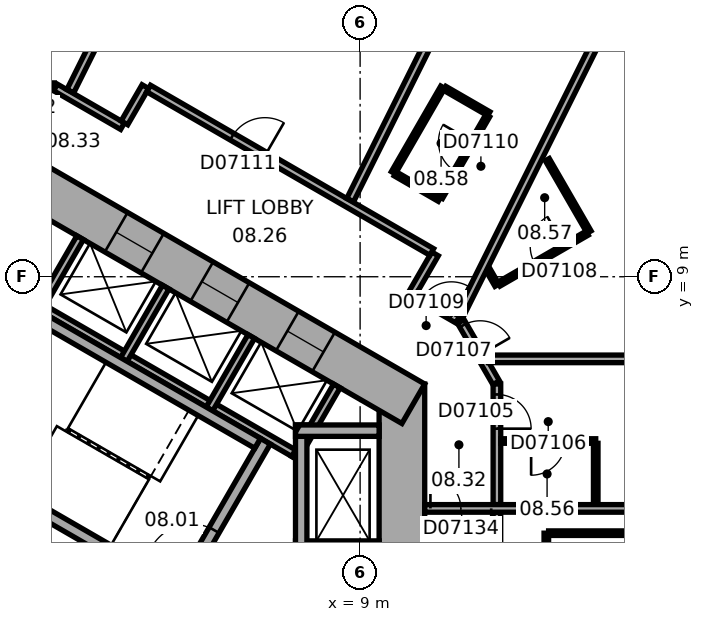
"""IFC4 building model, lengths in metres.
Left out: names, types, materials, properties, quantities, classifications, styles, units other than length and angle.
Written with IfcOpenShell. Run it as: python <this file> out.ifc"""

import sys

from ifc_helpers import new_model, si_unit, direction, frame, frame_2d, origin, place, context, subcontext, project, spatial, rectangle, extrude, element, fill, save


model = new_model("IFC4")
c1 = context("Model", 3, precision=1e-05, world=origin(), true_north=direction((0.0, 1.0)))
c2 = subcontext(c1, "Body", "Model", "MODEL_VIEW")
j1 = project(units=[si_unit("LENGTHUNIT", "METRE"), si_unit("PLANEANGLEUNIT", "RADIAN")], contexts=[c1])
p1 = place(None, origin())
s1 = spatial("IfcSite", under=j1, at=p1, CompositionType="ELEMENT")
p2 = place(p1, origin())
s2 = spatial("IfcBuilding", under=s1, at=p2, CompositionType="ELEMENT")
p3 = place(p2, frame((0.0, 0.0, 47.3)))
s3 = spatial("IfcBuildingStorey", under=s2, at=p3, CompositionType="ELEMENT", Elevation=47.3)
p4 = place(p3, frame((10.1, -6.177, 0.0), z_axis=(0.0, 0.0, 1.0), x_axis=(0.0, 1.0, 0.0)))
e1 = element("IfcWall", 1, at=p4, inside=s3, PredefinedType="SHEAR", context=c2, shape_type="SweptSolid", body=[
    extrude(rectangle(XDim=12.355, YDim=1.2, at=frame_2d((6.177, 0.0))), origin(), (0.0, 0.0, 1.0), 3.3),
])
p5 = place(p4, frame((6.378, 0.0, 0.0)))
e2 = element("IfcOpeningElement", 2, at=p5, cuts=e1, PredefinedType="OPENING", context=c2, shape_type="SweptSolid", body=[
    extrude(rectangle(XDim=1.5, YDim=2.1, at=frame_2d((0.75, 1.05))), frame((0.0, 0.61, 0.0), z_axis=(0.0, -1.0, 0.0), x_axis=(1.0, 0.0, 0.0)), (0.0, 0.0, 1.0), 1.22),
])
p6 = place(p4, frame((1.828, 0.0, 0.0)))
e3 = element("IfcOpeningElement", 3, at=p6, cuts=e1, PredefinedType="OPENING", context=c2, shape_type="SweptSolid", body=[
    extrude(rectangle(XDim=1.1, YDim=2.1, at=frame_2d((0.55, 1.05))), frame((0.0, 0.61, 0.0), z_axis=(0.0, -1.0, 0.0), x_axis=(1.0, 0.0, 0.0)), (0.0, 0.0, 1.0), 1.22),
])
p7 = place(p4, frame((4.427, 0.0, 0.0)))
e4 = element("IfcOpeningElement", 4, at=p7, cuts=e1, PredefinedType="OPENING", context=c2, shape_type="SweptSolid", body=[
    extrude(rectangle(XDim=1.1, YDim=2.1, at=frame_2d((0.55, 1.05))), frame((0.0, 0.61, 0.0), z_axis=(0.0, -1.0, 0.0), x_axis=(1.0, 0.0, 0.0)), (0.0, 0.0, 1.0), 1.22),
])
p8 = place(p3, frame((10.4, 5.658, 0.0), z_axis=(0.0, 0.0, 1.0), x_axis=(-0.866021384402, 0.500006961711, 0.0)))
e5 = element("IfcWall", 5, at=p8, inside=s3, PredefinedType="SHEAR", context=c2, shape_type="SweptSolid", body=[
    extrude(rectangle(XDim=12.355, YDim=1.2, at=frame_2d((6.178, 0.0))), origin(), (0.0, 0.0, 1.0), 3.3),
])
p9 = place(p8, frame((2.728, 0.0, 0.0)))
e6 = element("IfcOpeningElement", 6, at=p9, cuts=e5, PredefinedType="OPENING", context=c2, shape_type="SweptSolid", body=[
    extrude(rectangle(XDim=1.1, YDim=2.1, at=frame_2d((0.55, 1.05))), frame((0.0, 0.61, 0.0), z_axis=(0.0, -1.0, 0.0), x_axis=(1.0, 0.0, 0.0)), (0.0, 0.0, 1.0), 1.22),
])
p10 = place(p8, frame((5.328, 0.0, 0.0)))
e7 = element("IfcOpeningElement", 7, at=p10, cuts=e5, PredefinedType="OPENING", context=c2, shape_type="SweptSolid", body=[
    extrude(rectangle(XDim=1.1, YDim=2.1, at=frame_2d((0.55, 1.05))), frame((0.0, 0.61, 0.0), z_axis=(0.0, -1.0, 0.0), x_axis=(1.0, 0.0, 0.0)), (0.0, 0.0, 1.0), 1.22),
])
p11 = place(p8, frame((7.928, 0.0, 0.0)))
e8 = element("IfcOpeningElement", 8, at=p11, cuts=e5, PredefinedType="OPENING", context=c2, shape_type="SweptSolid", body=[
    extrude(rectangle(XDim=1.1, YDim=2.1, at=frame_2d((0.55, 1.05))), frame((0.0, 0.61, 0.0), z_axis=(0.0, -1.0, 0.0), x_axis=(1.0, 0.0, 0.0)), (0.0, 0.0, 1.0), 1.22),
])
p12 = place(p3, frame((7.424, 4.259, 0.0), z_axis=(0.0, 0.0, 1.0), x_axis=(-0.866026010844, 0.49999894854, 0.0)))
e9 = element("IfcWall", 9, at=p12, inside=s3, PredefinedType="PARTITIONING", context=c2, shape_type="SweptSolid", body=[
    extrude(rectangle(XDim=8.0, YDim=0.2, at=frame_2d((4.0, 0.0))), origin(), (0.0, 0.0, 1.0), 3.05),
])
for number, where, z_axis, x_axis in (
    (10, (7.287, 4.222, 0.0), (0.0, 0.0, 1.0), (0.5, 0.866, 0.0)),
    (11, (5.036, 5.522, 0.0), (0.0, 0.0, 1.0), (0.5, 0.866, 0.0)),
    (12, (2.784, 6.822, 0.0), (0.0, 0.0, 1.0), (0.5, 0.866, 0.0)),
    (13, (0.532, 8.122, 0.0), (0.0, 0.0, 1.0), (0.5, 0.866, 0.0)),
):
    element("IfcWall", number, at=place(p3, frame(where, z_axis=z_axis, x_axis=x_axis)), inside=s3, PredefinedType="PARTITIONING", context=c2, shape_type="SweptSolid", body=[
        extrude(rectangle(XDim=2.2, YDim=0.2, at=frame_2d((1.1, 0.0))), origin(), (0.0, 0.0, 1.0), 3.05),
    ])
p13 = place(p3, frame((4.158, 0.602, 0.0), z_axis=(0.0, 0.0, 1.0), x_axis=(0.499977259774, 0.866038532462, 0.0)))
e14 = element("IfcWall", 14, at=p13, inside=s3, PredefinedType="SHEAR", context=c2, shape_type="SweptSolid", body=[
    extrude(rectangle(XDim=4.7, YDim=0.3, at=frame_2d((2.35, 0.0))), origin(), (0.0, 0.0, 1.0), 3.05),
])
p14 = place(p13, frame((0.8, 0.0, 0.0)))
e15 = element("IfcOpeningElement", 15, at=p14, cuts=e14, PredefinedType="OPENING", context=c2, shape_type="SweptSolid", body=[
    extrude(rectangle(XDim=1.2, YDim=2.1, at=frame_2d((0.6, 1.05))), frame((0.0, 0.16, 0.0), z_axis=(0.0, -1.0, 0.0), x_axis=(1.0, 0.0, 0.0)), (0.0, 0.0, 1.0), 0.32),
])
for number, where, z_axis, x_axis in (
    (16, (4.103, 0.807, 0.0), (0.0, 0.0, 1.0), (-0.866, 0.5, 0.0)),
    (17, (6.303, 4.617, 0.0), (0.0, 0.0, 1.0), (-0.866, 0.5, 0.0)),
):
    element("IfcWall", number, at=place(p3, frame(where, z_axis=z_axis, x_axis=x_axis)), inside=s3, PredefinedType="SHEAR", context=c2, shape_type="SweptSolid", body=[
        extrude(rectangle(XDim=7.06, YDim=0.3, at=frame_2d((3.53, 0.0))), origin(), (0.0, 0.0, 1.0), 3.05),
    ])
p15 = place(p3, frame((7.3, 1.9, 0.0), z_axis=(0.0, 0.0, 1.0), x_axis=(1.0, 0.0, 0.0)))
e18 = element("IfcWall", 18, at=p15, inside=s3, PredefinedType="SHEAR", context=c2, shape_type="SweptSolid", body=[
    extrude(rectangle(XDim=2.2, YDim=0.3, at=frame_2d((1.1, 0.0))), origin(), (0.0, 0.0, 1.0), 3.05),
])
p16 = place(p15, frame((0.7, 0.0, 0.0)))
e19 = element("IfcOpeningElement", 19, at=p16, cuts=e18, PredefinedType="OPENING", context=c2, shape_type="SweptSolid", body=[
    extrude(rectangle(XDim=1.1, YDim=2.1, at=frame_2d((0.55, 1.05))), frame((0.0, 0.16, 0.0), z_axis=(0.0, -1.0, 0.0), x_axis=(1.0, 0.0, 0.0)), (0.0, 0.0, 1.0), 0.32),
])
p17 = place(p3, frame((7.45, 1.75, 0.0), z_axis=(0.0, 0.0, 1.0), x_axis=(0.0, 1.0, 0.0)))
e20 = element("IfcWall", 20, at=p17, inside=s3, PredefinedType="SHEAR", context=c2, shape_type="SweptSolid", body=[
    extrude(rectangle(XDim=3.35, YDim=0.3, at=frame_2d((1.675, 0.0))), origin(), (0.0, 0.0, 1.0), 3.05),
])
p18 = place(p3, frame((7.3, 4.95, 0.0), z_axis=(0.0, 0.0, 1.0), x_axis=(1.0, 0.0, 0.0)))
e21 = element("IfcWall", 21, at=p18, inside=s3, PredefinedType="SHEAR", context=c2, shape_type="SweptSolid", body=[
    extrude(rectangle(XDim=2.2, YDim=0.3, at=frame_2d((1.1, 0.0))), origin(), (0.0, 0.0, 1.0), 3.05),
])
p19 = place(p3, frame((0.95, 14.001, 0.0), z_axis=(0.0, 0.0, 1.0), x_axis=(-1.0, 0.0, 0.0)))
e22 = element("IfcWall", 22, at=p19, inside=s3, PredefinedType="PARTITIONING", context=c2, shape_type="SweptSolid", body=[
    extrude(rectangle(XDim=1.86, YDim=0.2, at=frame_2d((0.93, 0.0))), origin(), (0.0, 0.0, 1.0), 3.05),
])
p20 = place(p19, frame((0.48, 0.0, 0.0)))
e23 = element("IfcOpeningElement", 23, at=p20, cuts=e22, PredefinedType="OPENING", context=c2, shape_type="SweptSolid", body=[
    extrude(rectangle(XDim=0.9, YDim=2.1, at=frame_2d((0.45, 1.05))), frame((0.0, 0.11, 0.0), z_axis=(0.0, -1.0, 0.0), x_axis=(1.0, 0.0, 0.0)), (0.0, 0.0, 1.0), 0.22),
])
p21 = place(p3, frame((2.748, 12.962, 0.0), z_axis=(0.0, 0.0, 1.0), x_axis=(-0.866013897511, 0.50001992892, 0.0)))
e24 = element("IfcWall", 24, at=p21, inside=s3, PredefinedType="PARTITIONING", context=c2, shape_type="SweptSolid", body=[
    extrude(rectangle(XDim=2.037, YDim=0.2, at=frame_2d((1.018, 0.0))), origin(), (0.0, 0.0, 1.0), 3.05),
])
p22 = place(p3, frame((3.349, 14.002, 0.0), z_axis=(0.0, 0.0, 1.0), x_axis=(-0.500074377092, -0.865982457891, 0.0)))
e25 = element("IfcWall", 25, at=p22, inside=s3, PredefinedType="PARTITIONING", context=c2, shape_type="SweptSolid", body=[
    extrude(rectangle(XDim=1.101, YDim=0.2, at=frame_2d((0.55, 0.0))), origin(), (0.0, 0.0, 1.0), 3.05),
])
p23 = place(p3, frame((5.351, 21.859, 0.0), z_axis=(0.0, 0.0, 1.0), x_axis=(-0.446205309328, -0.894930624086, 0.0)))
e26 = element("IfcWall", 26, at=p23, inside=s3, PredefinedType="PARTITIONING", context=c2, shape_type="SweptSolid", body=[
    extrude(rectangle(XDim=8.913, YDim=0.2, at=frame_2d((4.457, 0.0))), origin(), (0.0, 0.0, 1.0), 2.6),
])
p24 = place(p3, frame((9.875, 11.736, 0.0), z_axis=(0.0, 0.0, 1.0), x_axis=(0.499936506574, 0.866062058628, 0.0)))
e27 = element("IfcWall", 27, at=p24, inside=s3, PredefinedType="PARTITIONING", context=c2, shape_type="SweptSolid", body=[
    extrude(rectangle(XDim=2.6, YDim=0.12, at=frame_2d((1.3, 0.0))), origin(), (0.0, 0.0, 1.0), 3.05),
])
p25 = place(p3, frame((10.371, 8.561, 0.0), z_axis=(0.0, 0.0, 1.0), x_axis=(0.499986357472, 0.866033280158, 0.0)))
e28 = element("IfcWall", 28, at=p25, inside=s3, PredefinedType="PARTITIONING", context=c2, shape_type="SweptSolid", body=[
    extrude(rectangle(XDim=1.201, YDim=0.2, at=frame_2d((0.601, 0.0))), origin(), (0.0, 0.0, 1.0), 3.05),
])
p26 = place(p3, frame((10.885, 9.652, 0.0), z_axis=(0.0, 0.0, 1.0), x_axis=(-0.866033868542, 0.499985338323, 0.0)))
e29 = element("IfcWall", 29, at=p26, inside=s3, PredefinedType="PARTITIONING", context=c2, shape_type="SweptSolid", body=[
    extrude(rectangle(XDim=8.602, YDim=0.2, at=frame_2d((4.301, 0.0))), origin(), (0.0, 0.0, 1.0), 3.05),
])
p27 = place(p26, frame((5.069, 0.0, 0.0)))
e30 = element("IfcOpeningElement", 30, at=p27, cuts=e29, PredefinedType="OPENING", context=c2, shape_type="SweptSolid", body=[
    extrude(rectangle(XDim=1.0, YDim=2.1, at=frame_2d((0.5, 1.05))), frame((0.0, 0.11, 0.0), z_axis=(0.0, -1.0, 0.0), x_axis=(1.0, 0.0, 0.0)), (0.0, 0.0, 1.0), 0.22),
])
for number, where, z_axis, x_axis in (
    (31, (11.087, 11.036, 0.0), (0.0, 0.0, 1.0), (-0.866, 0.5, 0.0)),
    (32, (11.226, 13.958, 0.0), (0.0, 0.0, 1.0), (0.866, -0.5, 0.0)),
):
    element("IfcWall", number, at=place(p3, frame(where, z_axis=z_axis, x_axis=x_axis)), inside=s3, PredefinedType="PARTITIONING", context=c2, shape_type="SweptSolid", body=[
        extrude(rectangle(XDim=1.34, YDim=0.12, at=frame_2d((0.67, 0.0))), origin(), (0.0, 0.0, 1.0), 3.05),
    ])
p28 = place(p3, frame((11.566, 7.871, 0.0), z_axis=(0.0, 0.0, 1.0), x_axis=(-0.866004557827, 0.500036104519, 0.0)))
e33 = element("IfcWall", 33, at=p28, inside=s3, PredefinedType="PARTITIONING", context=c2, shape_type="SweptSolid", body=[
    extrude(rectangle(XDim=1.28, YDim=0.2, at=frame_2d((0.64, 0.0))), origin(), (0.0, 0.0, 1.0), 3.05),
])
p29 = place(p28, frame((0.19, 0.0, 0.0)))
e34 = element("IfcOpeningElement", 34, at=p29, cuts=e33, PredefinedType="OPENING", context=c2, shape_type="SweptSolid", body=[
    extrude(rectangle(XDim=0.9, YDim=2.1, at=frame_2d((0.45, 1.05))), frame((0.0, 0.11, 0.0), z_axis=(0.0, -1.0, 0.0), x_axis=(1.0, 0.0, 0.0)), (0.0, 0.0, 1.0), 0.22),
])
p30 = place(p3, frame((12.357, 13.236, 0.0), z_axis=(0.0, 0.0, 1.0), x_axis=(-0.50000366821, -0.866023285932, 0.0)))
e35 = element("IfcWall", 35, at=p30, inside=s3, PredefinedType="PARTITIONING", context=c2, shape_type="SweptSolid", body=[
    extrude(rectangle(XDim=2.48, YDim=0.12, at=frame_2d((1.24, 0.0))), origin(), (0.0, 0.0, 1.0), 3.05),
])
p31 = place(p30, frame((0.79, 0.0, 0.0)))
e36 = element("IfcOpeningElement", 36, at=p31, cuts=e35, PredefinedType="OPENING", context=c2, shape_type="SweptSolid", body=[
    extrude(rectangle(XDim=0.9, YDim=2.1, at=frame_2d((0.45, 1.05))), frame((0.0, 0.07, 0.0), z_axis=(0.0, -1.0, 0.0), x_axis=(1.0, 0.0, 0.0)), (0.0, 0.0, 1.0), 0.14),
])
p32 = place(p3, frame((12.393, 18.348, 0.0), z_axis=(0.0, 0.0, 1.0), x_axis=(-0.446176022699, -0.894945225569, 0.0)))
e37 = element("IfcWall", 37, at=p32, inside=s3, PredefinedType="PARTITIONING", context=c2, shape_type="SweptSolid", body=[
    extrude(rectangle(XDim=8.191, YDim=0.2, at=frame_2d((4.095, 0.0))), origin(), (0.0, 0.0, 1.0), 2.6),
])
p33 = place(p3, frame((12.58, 6.212, 0.0), z_axis=(0.0, 0.0, 1.0), x_axis=(-0.500063286585, 0.865988862174, 0.0)))
e38 = element("IfcWall", 38, at=p33, inside=s3, PredefinedType="PARTITIONING", context=c2, shape_type="SweptSolid", body=[
    extrude(rectangle(XDim=1.86, YDim=0.2, at=frame_2d((0.93, 0.0))), origin(), (0.0, 0.0, 1.0), 3.05),
])
p34 = place(p33, frame((0.842, 0.0, 0.0)))
e39 = element("IfcOpeningElement", 39, at=p34, cuts=e38, PredefinedType="OPENING", context=c2, shape_type="SweptSolid", body=[
    extrude(rectangle(XDim=0.9, YDim=2.1, at=frame_2d((0.45, 1.05))), frame((0.0, 0.11, 0.0), z_axis=(0.0, -1.0, 0.0), x_axis=(1.0, 0.0, 0.0)), (0.0, 0.0, 1.0), 0.22),
])
p35 = place(p3, frame((12.6, 0.201, 0.0), z_axis=(0.0, 0.0, 1.0), x_axis=(0.0, 1.0, 0.0)))
e40 = element("IfcWall", 40, at=p35, inside=s3, PredefinedType="PARTITIONING", context=c2, shape_type="SweptSolid", body=[
    extrude(rectangle(XDim=2.604, YDim=0.2, at=frame_2d((1.302, 0.0))), origin(), (0.0, 0.0, 1.0), 3.05),
])
p36 = place(p3, frame((12.6, 3.004, 0.0), z_axis=(0.0, 0.0, 1.0), x_axis=(0.0, 1.0, 0.0)))
e41 = element("IfcWall", 41, at=p36, inside=s3, PredefinedType="PARTITIONING", context=c2, shape_type="SweptSolid", body=[
    extrude(rectangle(XDim=3.173, YDim=0.2, at=frame_2d((1.586, 0.0))), origin(), (0.0, 0.0, 1.0), 3.05),
])
p37 = place(p36, frame((1.998, 0.0, 0.0)))
e42 = element("IfcOpeningElement", 42, at=p37, cuts=e41, PredefinedType="OPENING", context=c2, shape_type="SweptSolid", body=[
    extrude(rectangle(XDim=0.9, YDim=2.1, at=frame_2d((0.45, 1.05))), frame((0.0, 0.11, 0.0), z_axis=(0.0, -1.0, 0.0), x_axis=(1.0, 0.0, 0.0)), (0.0, 0.0, 1.0), 0.22),
])
p38 = place(p3, frame((12.601, 8.776, 0.0), z_axis=(0.0, 0.0, 1.0), x_axis=(-0.500166486798, 0.865929261247, 0.0)))
e43 = element("IfcWall", 43, at=p38, inside=s3, PredefinedType="PARTITIONING", context=c2, shape_type="SweptSolid", body=[
    extrude(rectangle(XDim=0.476, YDim=0.12, at=frame_2d((0.238, 0.0))), origin(), (0.0, 0.0, 1.0), 3.05),
])
p39 = place(p3, frame((12.7, 4.677, 0.0), z_axis=(0.0, 0.0, 1.0), x_axis=(1.0, 0.0, 0.0)))
e44 = element("IfcWall", 44, at=p39, inside=s3, PredefinedType="PARTITIONING", context=c2, shape_type="SweptSolid", body=[
    extrude(rectangle(XDim=2.5, YDim=0.12, at=frame_2d((1.25, 0.0))), origin(), (0.0, 0.0, 1.0), 3.05),
])
p40 = place(p39, frame((0.8, 0.0, 0.0)))
e45 = element("IfcOpeningElement", 45, at=p40, cuts=e44, PredefinedType="OPENING", context=c2, shape_type="SweptSolid", body=[
    extrude(rectangle(XDim=0.9, YDim=2.1, at=frame_2d((0.45, 1.05))), frame((0.0, 0.07, 0.0), z_axis=(0.0, -1.0, 0.0), x_axis=(1.0, 0.0, 0.0)), (0.0, 0.0, 1.0), 0.14),
])
p41 = place(p3, frame((13.9, 0.853, 0.0), z_axis=(0.0, 0.0, 1.0), x_axis=(0.0, 1.0, 0.0)))
e46 = element("IfcWall", 46, at=p41, inside=s3, PredefinedType="PARTITIONING", context=c2, shape_type="SweptSolid", body=[
    extrude(rectangle(XDim=1.4, YDim=0.12, at=frame_2d((0.7, 0.0))), origin(), (0.0, 0.0, 1.0), 3.05),
])
p42 = place(p3, frame((13.926, 12.081, 0.0), z_axis=(0.0, 0.0, 1.0), x_axis=(0.499994660107, -0.866028486751, 0.0)))
e47 = element("IfcWall", 47, at=p42, inside=s3, PredefinedType="PARTITIONING", context=c2, shape_type="SweptSolid", body=[
    extrude(rectangle(XDim=2.2, YDim=0.12, at=frame_2d((1.1, 0.0))), origin(), (0.0, 0.0, 1.0), 3.05),
])
p43 = place(p3, frame((13.96, 2.253, 0.0), z_axis=(0.0, 0.0, 1.0), x_axis=(1.0, 0.0, 0.0)))
e48 = element("IfcWall", 48, at=p43, inside=s3, PredefinedType="PARTITIONING", context=c2, shape_type="SweptSolid", body=[
    extrude(rectangle(XDim=2.54, YDim=0.12, at=frame_2d((1.27, 0.0))), origin(), (0.0, 0.0, 1.0), 3.05),
])
p44 = place(p3, frame((14.974, 10.146, 0.0), z_axis=(0.0, 0.0, 1.0), x_axis=(-0.86599746015, -0.500048396672, 0.0)))
e49 = element("IfcWall", 49, at=p44, inside=s3, PredefinedType="PARTITIONING", context=c2, shape_type="SweptSolid", body=[
    extrude(rectangle(XDim=2.68, YDim=0.12, at=frame_2d((1.34, 0.0))), origin(), (0.0, 0.0, 1.0), 3.05),
])
p45 = place(p44, frame((0.69, 0.0, 0.0)))
e50 = element("IfcOpeningElement", 50, at=p45, cuts=e49, PredefinedType="OPENING", context=c2, shape_type="SweptSolid", body=[
    extrude(rectangle(XDim=0.9, YDim=2.1, at=frame_2d((0.45, 1.05))), frame((0.0, 0.07, 0.0), z_axis=(0.0, -1.0, 0.0), x_axis=(1.0, 0.0, 0.0)), (0.0, 0.0, 1.0), 0.14),
])
p46 = place(p3, frame((15.2, 4.618, 0.0), z_axis=(0.0, 0.0, 1.0), x_axis=(0.0, -1.0, 0.0)))
e51 = element("IfcWall", 51, at=p46, inside=s3, PredefinedType="PARTITIONING", context=c2, shape_type="SweptSolid", body=[
    extrude(rectangle(XDim=1.613, YDim=0.12, at=frame_2d((0.807, 0.0))), origin(), (0.0, 0.0, 1.0), 3.05),
])
p47 = place(p3, frame((15.915, 16.592, 0.0), z_axis=(0.0, 0.0, 1.0), x_axis=(-0.446199736347, -0.894933402709, 0.0)))
e52 = element("IfcWall", 52, at=p47, inside=s3, PredefinedType="PARTITIONING", context=c2, shape_type="SweptSolid", body=[
    extrude(rectangle(XDim=9.635, YDim=0.2, at=frame_2d((4.817, 0.0))), origin(), (0.0, 0.0, 1.0), 3.05),
])
p48 = place(p3, frame((21.95, 2.905, 0.0), z_axis=(0.0, 0.0, 1.0), x_axis=(-1.0, 0.0, 0.0)))
e53 = element("IfcWall", 53, at=p48, inside=s3, PredefinedType="PARTITIONING", context=c2, shape_type="SweptSolid", body=[
    extrude(rectangle(XDim=11.25, YDim=0.2, at=frame_2d((5.625, 0.0))), origin(), (0.0, 0.0, 1.0), 3.05),
])
p49 = place(p48, frame((9.5, 0.0, 0.0)))
e54 = element("IfcOpeningElement", 54, at=p49, cuts=e53, PredefinedType="OPENING", context=c2, shape_type="SweptSolid", body=[
    extrude(rectangle(XDim=1.6, YDim=2.1, at=frame_2d((0.8, 1.05))), frame((0.0, 0.11, 0.0), z_axis=(0.0, -1.0, 0.0), x_axis=(1.0, 0.0, 0.0)), (0.0, 0.0, 1.0), 0.22),
])
p50 = place(p3, frame((21.95, 6.839, 0.0), z_axis=(0.0, 0.0, 1.0), x_axis=(-1.0, 0.0, 0.0)))
e55 = element("IfcWall", 55, at=p50, inside=s3, PredefinedType="PARTITIONING", context=c2, shape_type="SweptSolid", body=[
    extrude(rectangle(XDim=9.572, YDim=0.2, at=frame_2d((4.786, 0.0))), origin(), (0.0, 0.0, 1.0), 3.05),
])
p51 = place(p14, origin())
e56 = element("IfcDoor", 56, at=p51, inside=s3, OperationType="SINGLE_SWING_RIGHT", PredefinedType="DOOR", context=c2, shape_type="SweptSolid", body=[
    extrude(rectangle(XDim=1.2, YDim=2.1, at=frame_2d((0.6, 1.05))), frame((0.0, 0.025, 0.0), z_axis=(0.0, -1.0, 0.0), x_axis=(1.0, 0.0, 0.0)), (0.0, 0.0, 1.0), 0.05),
])
fill(e15, e56)
p52 = place(p9, origin())
e57 = element("IfcDoor", 57, at=p52, inside=s3, OperationType="DOUBLE_DOOR_SLIDING", PredefinedType="DOOR", context=c2, shape_type="SweptSolid", body=[
    extrude(rectangle(XDim=1.1, YDim=2.1, at=frame_2d((0.55, 1.05))), frame((0.0, 0.025, 0.0), z_axis=(0.0, -1.0, 0.0), x_axis=(1.0, 0.0, 0.0)), (0.0, 0.0, 1.0), 0.05),
])
fill(e6, e57)
p53 = place(p10, origin())
e58 = element("IfcDoor", 58, at=p53, inside=s3, OperationType="DOUBLE_DOOR_SLIDING", PredefinedType="DOOR", context=c2, shape_type="SweptSolid", body=[
    extrude(rectangle(XDim=1.1, YDim=2.1, at=frame_2d((0.55, 1.05))), frame((0.0, 0.025, 0.0), z_axis=(0.0, -1.0, 0.0), x_axis=(1.0, 0.0, 0.0)), (0.0, 0.0, 1.0), 0.05),
])
fill(e7, e58)
p54 = place(p11, origin())
e59 = element("IfcDoor", 59, at=p54, inside=s3, OperationType="DOUBLE_DOOR_SLIDING", PredefinedType="DOOR", context=c2, shape_type="SweptSolid", body=[
    extrude(rectangle(XDim=1.1, YDim=2.1, at=frame_2d((0.55, 1.05))), frame((0.0, 0.025, 0.0), z_axis=(0.0, -1.0, 0.0), x_axis=(1.0, 0.0, 0.0)), (0.0, 0.0, 1.0), 0.05),
])
fill(e8, e59)
p55 = place(p37, origin())
e60 = element("IfcDoor", 60, at=p55, inside=s3, OperationType="SINGLE_SWING_LEFT", PredefinedType="DOOR", context=c2, shape_type="SweptSolid", body=[
    extrude(rectangle(XDim=0.9, YDim=2.1, at=frame_2d((0.45, 1.05))), frame((0.0, 0.025, 0.0), z_axis=(0.0, -1.0, 0.0), x_axis=(1.0, 0.0, 0.0)), (0.0, 0.0, 1.0), 0.05),
])
fill(e42, e60)
p56 = place(p40, origin())
e61 = element("IfcDoor", 61, at=p56, inside=s3, OperationType="SINGLE_SWING_LEFT", PredefinedType="DOOR", context=c2, shape_type="SweptSolid", body=[
    extrude(rectangle(XDim=0.9, YDim=2.1, at=frame_2d((0.45, 1.05))), frame((0.0, 0.025, 0.0), z_axis=(0.0, -1.0, 0.0), x_axis=(1.0, 0.0, 0.0)), (0.0, 0.0, 1.0), 0.05),
])
fill(e45, e61)
p57 = place(p34, origin())
e62 = element("IfcDoor", 62, at=p57, inside=s3, OperationType="SINGLE_SWING_LEFT", PredefinedType="DOOR", context=c2, shape_type="SweptSolid", body=[
    extrude(rectangle(XDim=0.9, YDim=2.1, at=frame_2d((0.45, 1.05))), frame((0.0, 0.025, 0.0), z_axis=(0.0, -1.0, 0.0), x_axis=(1.0, 0.0, 0.0)), (0.0, 0.0, 1.0), 0.05),
])
fill(e39, e62)
p58 = place(p45, origin())
e63 = element("IfcDoor", 63, at=p58, inside=s3, OperationType="SINGLE_SWING_LEFT", PredefinedType="DOOR", context=c2, shape_type="SweptSolid", body=[
    extrude(rectangle(XDim=0.9, YDim=2.1, at=frame_2d((0.45, 1.05))), frame((0.0, 0.025, 0.0), z_axis=(0.0, -1.0, 0.0), x_axis=(1.0, 0.0, 0.0)), (0.0, 0.0, 1.0), 0.05),
])
fill(e50, e63)
p59 = place(p29, origin())
e64 = element("IfcDoor", 64, at=p59, inside=s3, OperationType="SINGLE_SWING_LEFT", PredefinedType="DOOR", context=c2, shape_type="SweptSolid", body=[
    extrude(rectangle(XDim=0.9, YDim=2.1, at=frame_2d((0.45, 1.05))), frame((0.0, 0.025, 0.0), z_axis=(0.0, -1.0, 0.0), x_axis=(1.0, 0.0, 0.0)), (0.0, 0.0, 1.0), 0.05),
])
fill(e34, e64)
p60 = place(p31, origin())
e65 = element("IfcDoor", 65, at=p60, inside=s3, OperationType="SINGLE_SWING_LEFT", PredefinedType="DOOR", context=c2, shape_type="SweptSolid", body=[
    extrude(rectangle(XDim=0.9, YDim=2.1, at=frame_2d((0.45, 1.05))), frame((0.0, 0.025, 0.0), z_axis=(0.0, -1.0, 0.0), x_axis=(1.0, 0.0, 0.0)), (0.0, 0.0, 1.0), 0.05),
])
fill(e36, e65)
p61 = place(p27, origin())
e66 = element("IfcDoor", 66, at=p61, inside=s3, OperationType="SINGLE_SWING_LEFT", PredefinedType="DOOR", context=c2, shape_type="SweptSolid", body=[
    extrude(rectangle(XDim=1.0, YDim=2.1, at=frame_2d((0.5, 1.05))), frame((0.0, 0.025, 0.0), z_axis=(0.0, -1.0, 0.0), x_axis=(1.0, 0.0, 0.0)), (0.0, 0.0, 1.0), 0.05),
])
fill(e30, e66)
p62 = place(p49, origin())
e67 = element("IfcDoor", 67, at=p62, inside=s3, OperationType="DOUBLE_DOOR_SINGLE_SWING", PredefinedType="DOOR", context=c2, shape_type="SweptSolid", body=[
    extrude(rectangle(XDim=1.6, YDim=2.1, at=frame_2d((0.8, 1.05))), frame((0.0, 0.025, 0.0), z_axis=(0.0, -1.0, 0.0), x_axis=(1.0, 0.0, 0.0)), (0.0, 0.0, 1.0), 0.05),
])
fill(e54, e67)
save(model, sys.argv[1])
